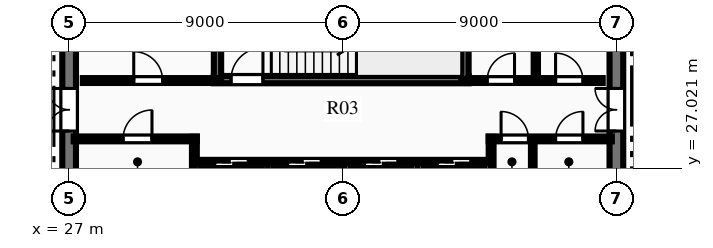
"""IFC4 building model, lengths in metres.
Left out: names, types, materials, properties, quantities, classifications, styles, units other than length and angle.
Written with IfcOpenShell. Run it as: python <this file> out.ifc"""

import sys

from ifc_helpers import new_model, si_unit, direction, frame, frame_2d, origin, place, context, subcontext, project, spatial, rectangle, extrude, element, fill, save


model = new_model("IFC4")
c1 = context("Model", 3, precision=1e-05, world=origin(), true_north=direction((0.0, 1.0)))
c2 = subcontext(c1, "Body", "Model", "MODEL_VIEW")
j1 = project(units=[si_unit("LENGTHUNIT", "METRE"), si_unit("PLANEANGLEUNIT", "RADIAN")], contexts=[c1])
p1 = place(None, origin())
s1 = spatial("IfcSite", under=j1, at=p1, CompositionType="ELEMENT")
p2 = place(p1, origin())
s2 = spatial("IfcBuilding", under=s1, at=p2, CompositionType="ELEMENT")
p3 = place(p2, frame((0.0, 0.0, 336.45)))
s3 = spatial("IfcBuildingStorey", under=s2, at=p3, CompositionType="ELEMENT", Elevation=336.45)
p4 = place(p3, frame((27.0, 18.225, 0.0), z_axis=(0.0, 0.0, 1.0), x_axis=(0.0, 1.0, 0.0)))
e1 = element("IfcWall", 1, at=p4, inside=s3, PredefinedType="SHEAR", context=c2, shape_type="SweptSolid", body=[
    extrude(rectangle(XDim=15.55, YDim=0.45, at=frame_2d((7.775, 0.0))), origin(), (0.0, 0.0, 1.0), 3.75),
])
p5 = place(p4, frame((10.015, 0.0, 0.0)))
e2 = element("IfcOpeningElement", 2, at=p5, cuts=e1, PredefinedType="OPENING", context=c2, shape_type="SweptSolid", body=[
    extrude(rectangle(XDim=1.4, YDim=2.2, at=frame_2d((0.7, 1.1))), frame((0.0, 0.235, 0.0), z_axis=(0.0, -1.0, 0.0), x_axis=(1.0, 0.0, 0.0)), (0.0, 0.0, 1.0), 0.47),
])
p6 = place(p3, frame((45.0, 18.225, 0.0), z_axis=(0.0, 0.0, 1.0), x_axis=(0.0, 1.0, 0.0)))
e3 = element("IfcWall", 3, at=p6, inside=s3, PredefinedType="SHEAR", context=c2, shape_type="SweptSolid", body=[
    extrude(rectangle(XDim=15.55, YDim=0.45, at=frame_2d((7.775, 0.0))), origin(), (0.0, 0.0, 1.0), 3.75),
])
p7 = place(p6, frame((10.015, 0.0, 0.0)))
e4 = element("IfcOpeningElement", 4, at=p7, cuts=e3, PredefinedType="OPENING", context=c2, shape_type="SweptSolid", body=[
    extrude(rectangle(XDim=1.4, YDim=2.2, at=frame_2d((0.7, 1.1))), frame((0.0, 0.235, 0.0), z_axis=(0.0, -1.0, 0.0), x_axis=(1.0, 0.0, 0.0)), (0.0, 0.0, 1.0), 0.47),
])
p8 = place(p3, frame((31.76, 29.93, 0.0), z_axis=(0.0, 0.0, 1.0), x_axis=(1.0, 0.0, 0.0)))
e5 = element("IfcWall", 5, at=p8, inside=s3, PredefinedType="SHEAR", context=c2, shape_type="SweptSolid", body=[
    extrude(rectangle(XDim=8.38, YDim=0.24, at=frame_2d((4.19, 0.0))), origin(), (0.0, 0.0, 1.0), 3.75),
])
p9 = place(p8, frame((0.565, 0.0, 0.0)))
e6 = element("IfcOpeningElement", 6, at=p9, cuts=e5, PredefinedType="OPENING", context=c2, shape_type="SweptSolid", body=[
    extrude(rectangle(XDim=1.05, YDim=2.15, at=frame_2d((0.525, 1.075))), frame((0.0, 0.13, 0.0), z_axis=(0.0, -1.0, 0.0), x_axis=(1.0, 0.0, 0.0)), (0.0, 0.0, 1.0), 0.26),
])
p10 = place(p3, frame((31.88, 29.93, 0.0), z_axis=(0.0, 0.0, 1.0), x_axis=(0.0, 1.0, 0.0)))
e7 = element("IfcWall", 7, at=p10, inside=s3, PredefinedType="SHEAR", context=c2, shape_type="SweptSolid", body=[
    extrude(rectangle(XDim=3.79, YDim=0.24, at=frame_2d((1.895, 0.0))), origin(), (0.0, 0.0, 1.0), 3.75),
])
p11 = place(p3, frame((40.02, 29.93, 0.0), z_axis=(0.0, 0.0, 1.0), x_axis=(0.0, 1.0, 0.0)))
e8 = element("IfcWall", 8, at=p11, inside=s3, PredefinedType="SHEAR", context=c2, shape_type="SweptSolid", body=[
    extrude(rectangle(XDim=3.85, YDim=0.24, at=frame_2d((1.925, 0.0))), origin(), (0.0, 0.0, 1.0), 3.75),
])
p12 = place(p3, frame((27.15, 27.98, 0.0), z_axis=(0.0, 0.0, 1.0), x_axis=(1.0, 0.0, 0.0)))
e9 = element("IfcWall", 9, at=p12, inside=s3, PredefinedType="PARTITIONING", context=c2, shape_type="SweptSolid", body=[
    extrude(rectangle(XDim=4.05, YDim=0.16, at=frame_2d((2.025, 0.0))), origin(), (0.0, 0.0, 1.0), 3.49),
])
p13 = place(p12, frame((1.625, 0.0, 0.0)))
e10 = element("IfcOpeningElement", 10, at=p13, cuts=e9, PredefinedType="OPENING", context=c2, shape_type="SweptSolid", body=[
    extrude(rectangle(XDim=0.95, YDim=2.15, at=frame_2d((0.475, 1.075))), frame((0.0, 0.09, 0.0), z_axis=(0.0, -1.0, 0.0), x_axis=(1.0, 0.0, 0.0)), (0.0, 0.0, 1.0), 0.18),
])
p14 = place(p3, frame((31.12, 26.54, 0.0), z_axis=(0.0, 0.0, 1.0), x_axis=(0.0, 1.0, 0.0)))
e11 = element("IfcWall", 11, at=p14, inside=s3, PredefinedType="PARTITIONING", context=c2, shape_type="SweptSolid", body=[
    extrude(rectangle(XDim=1.51, YDim=0.16, at=frame_2d((0.755, 0.0))), origin(), (0.0, 0.0, 1.0), 3.49),
])
p15 = place(p3, frame((40.8, 27.98, 0.0), z_axis=(0.0, 0.0, 1.0), x_axis=(1.0, 0.0, 0.0)))
e12 = element("IfcWall", 12, at=p15, inside=s3, PredefinedType="PARTITIONING", context=c2, shape_type="SweptSolid", body=[
    extrude(rectangle(XDim=4.05, YDim=0.16, at=frame_2d((2.025, 0.0))), origin(), (0.0, 0.0, 1.0), 3.49),
])
p16 = place(p15, frame((0.407, 0.0, 0.0)))
e13 = element("IfcOpeningElement", 13, at=p16, cuts=e12, PredefinedType="OPENING", context=c2, shape_type="SweptSolid", body=[
    extrude(rectangle(XDim=0.9, YDim=2.15, at=frame_2d((0.45, 1.075))), frame((0.0, 0.09, 0.0), z_axis=(0.0, -1.0, 0.0), x_axis=(1.0, 0.0, 0.0)), (0.0, 0.0, 1.0), 0.18),
])
p17 = place(p15, frame((2.2, 0.0, 0.0)))
e14 = element("IfcOpeningElement", 14, at=p17, cuts=e12, PredefinedType="OPENING", context=c2, shape_type="SweptSolid", body=[
    extrude(rectangle(XDim=0.9, YDim=2.15, at=frame_2d((0.45, 1.075))), frame((0.0, 0.09, 0.0), z_axis=(0.0, -1.0, 0.0), x_axis=(1.0, 0.0, 0.0)), (0.0, 0.0, 1.0), 0.18),
])
p18 = place(p3, frame((40.88, 26.54, 0.0), z_axis=(0.0, 0.0, 1.0), x_axis=(0.0, 1.0, 0.0)))
e15 = element("IfcWall", 15, at=p18, inside=s3, PredefinedType="PARTITIONING", context=c2, shape_type="SweptSolid", body=[
    extrude(rectangle(XDim=1.51, YDim=0.16, at=frame_2d((0.755, 0.0))), origin(), (0.0, 0.0, 1.0), 3.49),
])
p19 = place(p3, frame((42.25, 26.54, 0.0), z_axis=(0.0, 0.0, 1.0), x_axis=(0.0, 1.0, 0.0)))
e16 = element("IfcWall", 16, at=p19, inside=s3, PredefinedType="PARTITIONING", context=c2, shape_type="SweptSolid", body=[
    extrude(rectangle(XDim=1.44, YDim=0.12, at=frame_2d((0.72, 0.0))), origin(), (0.0, 0.0, 1.0), 3.49),
])
p20 = place(p3, frame((27.45, 29.9, 0.0), z_axis=(0.0, 0.0, 1.0), x_axis=(1.0, 0.0, 0.0)))
e17 = element("IfcWall", 17, at=p20, inside=s3, PredefinedType="PARTITIONING", context=c2, shape_type="SweptSolid", body=[
    extrude(rectangle(XDim=4.43, YDim=0.16, at=frame_2d((2.215, 0.0))), origin(), (0.0, 0.0, 1.0), 3.49),
])
p21 = place(p20, frame((1.675, 0.0, 0.0)))
e18 = element("IfcOpeningElement", 18, at=p21, cuts=e17, PredefinedType="OPENING", context=c2, shape_type="SweptSolid", body=[
    extrude(rectangle(XDim=0.95, YDim=2.15, at=frame_2d((0.475, 1.075))), frame((0.0, 0.09, 0.0), z_axis=(0.0, -1.0, 0.0), x_axis=(1.0, 0.0, 0.0)), (0.0, 0.0, 1.0), 0.18),
])
p22 = place(p3, frame((40.12, 29.9, 0.0), z_axis=(0.0, 0.0, 1.0), x_axis=(1.0, 0.0, 0.0)))
e19 = element("IfcWall", 19, at=p22, inside=s3, PredefinedType="PARTITIONING", context=c2, shape_type="SweptSolid", body=[
    extrude(rectangle(XDim=4.43, YDim=0.16, at=frame_2d((2.215, 0.0))), origin(), (0.0, 0.0, 1.0), 3.49),
])
p23 = place(p22, frame((0.63, 0.0, 0.0)))
e20 = element("IfcOpeningElement", 20, at=p23, cuts=e19, PredefinedType="OPENING", context=c2, shape_type="SweptSolid", body=[
    extrude(rectangle(XDim=0.9, YDim=2.15, at=frame_2d((0.45, 1.075))), frame((0.0, 0.09, 0.0), z_axis=(0.0, -1.0, 0.0), x_axis=(1.0, 0.0, 0.0)), (0.0, 0.0, 1.0), 0.18),
])
p24 = place(p22, frame((2.88, 0.0, 0.0)))
e21 = element("IfcOpeningElement", 21, at=p24, cuts=e19, PredefinedType="OPENING", context=c2, shape_type="SweptSolid", body=[
    extrude(rectangle(XDim=0.9, YDim=2.15, at=frame_2d((0.45, 1.075))), frame((0.0, 0.09, 0.0), z_axis=(0.0, -1.0, 0.0), x_axis=(1.0, 0.0, 0.0)), (0.0, 0.0, 1.0), 0.18),
])
p25 = place(p3, frame((42.35, 29.95, 0.0), z_axis=(0.0, 0.0, 1.0), x_axis=(0.0, 1.0, 0.0)))
e22 = element("IfcWall", 22, at=p25, inside=s3, PredefinedType="PARTITIONING", context=c2, shape_type="SweptSolid", body=[
    extrude(rectangle(XDim=3.6, YDim=0.14, at=frame_2d((1.8, 0.0))), origin(), (0.0, 0.0, 1.0), 3.49),
])
p26 = place(p3, frame((31.2, 27.2, 0.0), z_axis=(0.0, 0.0, 1.0), x_axis=(1.0, 0.0, 0.0)))
e23 = element("IfcWall", 23, at=p26, inside=s3, PredefinedType="PARTITIONING", context=c2, shape_type="SweptSolid", body=[
    extrude(rectangle(XDim=9.6, YDim=0.18, at=frame_2d((4.8, 0.0))), origin(), (0.0, 0.0, 1.0), 3.49),
])
p27 = place(p26, frame((0.59, 0.0, 0.0)))
e24 = element("IfcOpeningElement", 24, at=p27, cuts=e23, PredefinedType="OPENING", context=c2, shape_type="SweptSolid", body=[
    extrude(rectangle(XDim=1.1, YDim=2.15, at=frame_2d((0.55, 1.075))), frame((0.0, 0.1, 0.0), z_axis=(0.0, -1.0, 0.0), x_axis=(1.0, 0.0, 0.0)), (0.0, 0.0, 1.0), 0.2),
])
p28 = place(p26, frame((2.99, 0.0, 0.0)))
e25 = element("IfcOpeningElement", 25, at=p28, cuts=e23, PredefinedType="OPENING", context=c2, shape_type="SweptSolid", body=[
    extrude(rectangle(XDim=1.1, YDim=2.15, at=frame_2d((0.55, 1.075))), frame((0.0, 0.1, 0.0), z_axis=(0.0, -1.0, 0.0), x_axis=(1.0, 0.0, 0.0)), (0.0, 0.0, 1.0), 0.2),
])
p29 = place(p26, frame((5.51, 0.0, 0.0)))
e26 = element("IfcOpeningElement", 26, at=p29, cuts=e23, PredefinedType="OPENING", context=c2, shape_type="SweptSolid", body=[
    extrude(rectangle(XDim=1.1, YDim=2.15, at=frame_2d((0.55, 1.075))), frame((0.0, 0.1, 0.0), z_axis=(0.0, -1.0, 0.0), x_axis=(1.0, 0.0, 0.0)), (0.0, 0.0, 1.0), 0.2),
])
p30 = place(p26, frame((7.91, 0.0, 0.0)))
e27 = element("IfcOpeningElement", 27, at=p30, cuts=e23, PredefinedType="OPENING", context=c2, shape_type="SweptSolid", body=[
    extrude(rectangle(XDim=1.1, YDim=2.15, at=frame_2d((0.55, 1.075))), frame((0.0, 0.1, 0.0), z_axis=(0.0, -1.0, 0.0), x_axis=(1.0, 0.0, 0.0)), (0.0, 0.0, 1.0), 0.2),
])
for number, where, z_axis, x_axis in (
    (28, (33.54, 25.3, 0.0), (0.0, 0.0, 1.0), (0.0, 1.0, 0.0)),
    (29, (36.0, 25.3, 0.0), (0.0, 0.0, 1.0), (0.0, 1.0, 0.0)),
    (30, (38.46, 25.3, 0.0), (0.0, 0.0, 1.0), (0.0, 1.0, 0.0)),
):
    element("IfcWall", number, at=place(p3, frame(where, z_axis=z_axis, x_axis=x_axis)), inside=s3, PredefinedType="PARTITIONING", context=c2, shape_type="SweptSolid", body=[
        extrude(rectangle(XDim=1.9, YDim=0.18, at=frame_2d((0.95, 0.0))), origin(), (0.0, 0.0, 1.0), 3.49),
    ])
p31 = place(p13, origin())
e31 = element("IfcDoor", 31, at=p31, inside=s3, OperationType="SINGLE_SWING_RIGHT", PredefinedType="DOOR", context=c2, shape_type="SweptSolid", body=[
    extrude(rectangle(XDim=0.95, YDim=2.15, at=frame_2d((0.475, 1.075))), frame((0.0, 0.025, 0.0), z_axis=(0.0, -1.0, 0.0), x_axis=(1.0, 0.0, 0.0)), (0.0, 0.0, 1.0), 0.05),
])
fill(e10, e31)
p32 = place(p16, origin())
e32 = element("IfcDoor", 32, at=p32, inside=s3, OperationType="SINGLE_SWING_LEFT", PredefinedType="DOOR", context=c2, shape_type="SweptSolid", body=[
    extrude(rectangle(XDim=0.9, YDim=2.15, at=frame_2d((0.45, 1.075))), frame((0.0, 0.025, 0.0), z_axis=(0.0, -1.0, 0.0), x_axis=(1.0, 0.0, 0.0)), (0.0, 0.0, 1.0), 0.05),
])
fill(e13, e32)
p33 = place(p17, origin())
e33 = element("IfcDoor", 33, at=p33, inside=s3, OperationType="SINGLE_SWING_RIGHT", PredefinedType="DOOR", context=c2, shape_type="SweptSolid", body=[
    extrude(rectangle(XDim=0.9, YDim=2.15, at=frame_2d((0.45, 1.075))), frame((0.0, 0.025, 0.0), z_axis=(0.0, -1.0, 0.0), x_axis=(1.0, 0.0, 0.0)), (0.0, 0.0, 1.0), 0.05),
])
fill(e14, e33)
p34 = place(p21, origin())
e34 = element("IfcDoor", 34, at=p34, inside=s3, OperationType="SINGLE_SWING_LEFT", PredefinedType="DOOR", context=c2, shape_type="SweptSolid", body=[
    extrude(rectangle(XDim=0.95, YDim=2.15, at=frame_2d((0.475, 1.075))), frame((0.0, 0.025, 0.0), z_axis=(0.0, -1.0, 0.0), x_axis=(1.0, 0.0, 0.0)), (0.0, 0.0, 1.0), 0.05),
])
fill(e18, e34)
p35 = place(p23, origin())
e35 = element("IfcDoor", 35, at=p35, inside=s3, OperationType="SINGLE_SWING_RIGHT", PredefinedType="DOOR", context=c2, shape_type="SweptSolid", body=[
    extrude(rectangle(XDim=0.9, YDim=2.15, at=frame_2d((0.45, 1.075))), frame((0.0, 0.025, 0.0), z_axis=(0.0, -1.0, 0.0), x_axis=(1.0, 0.0, 0.0)), (0.0, 0.0, 1.0), 0.05),
])
fill(e20, e35)
p36 = place(p24, origin())
e36 = element("IfcDoor", 36, at=p36, inside=s3, OperationType="SINGLE_SWING_LEFT", PredefinedType="DOOR", context=c2, shape_type="SweptSolid", body=[
    extrude(rectangle(XDim=0.9, YDim=2.15, at=frame_2d((0.45, 1.075))), frame((0.0, 0.025, 0.0), z_axis=(0.0, -1.0, 0.0), x_axis=(1.0, 0.0, 0.0)), (0.0, 0.0, 1.0), 0.05),
])
fill(e21, e36)
p37 = place(p9, origin())
e37 = element("IfcDoor", 37, at=p37, inside=s3, OperationType="SINGLE_SWING_RIGHT", PredefinedType="DOOR", context=c2, shape_type="SweptSolid", body=[
    extrude(rectangle(XDim=1.05, YDim=2.15, at=frame_2d((0.525, 1.075))), frame((0.0, 0.025, 0.0), z_axis=(0.0, -1.0, 0.0), x_axis=(1.0, 0.0, 0.0)), (0.0, 0.0, 1.0), 0.05),
])
fill(e6, e37)
p38 = place(p5, origin())
e38 = element("IfcDoor", 38, at=p38, inside=s3, OperationType="DOUBLE_DOOR_SINGLE_SWING", PredefinedType="DOOR", context=c2, shape_type="SweptSolid", body=[
    extrude(rectangle(XDim=1.4, YDim=2.2, at=frame_2d((0.7, 1.1))), frame((0.0, 0.025, 0.0), z_axis=(0.0, -1.0, 0.0), x_axis=(1.0, 0.0, 0.0)), (0.0, 0.0, 1.0), 0.05),
])
fill(e2, e38)
p39 = place(p7, origin())
e39 = element("IfcDoor", 39, at=p39, inside=s3, OperationType="DOUBLE_DOOR_SINGLE_SWING", PredefinedType="DOOR", context=c2, shape_type="SweptSolid", body=[
    extrude(rectangle(XDim=1.4, YDim=2.2, at=frame_2d((0.7, 1.1))), frame((0.0, 0.025, 0.0), z_axis=(0.0, -1.0, 0.0), x_axis=(1.0, 0.0, 0.0)), (0.0, 0.0, 1.0), 0.05),
])
fill(e4, e39)
p40 = place(p27, origin())
e40 = element("IfcDoor", 40, at=p40, inside=s3, OperationType="SLIDING_TO_LEFT", PredefinedType="DOOR", context=c2, shape_type="SweptSolid", body=[
    extrude(rectangle(XDim=1.1, YDim=2.15, at=frame_2d((0.55, 1.075))), frame((0.0, 0.025, 0.0), z_axis=(0.0, -1.0, 0.0), x_axis=(1.0, 0.0, 0.0)), (0.0, 0.0, 1.0), 0.05),
])
fill(e24, e40)
p41 = place(p28, origin())
e41 = element("IfcDoor", 41, at=p41, inside=s3, OperationType="SLIDING_TO_LEFT", PredefinedType="DOOR", context=c2, shape_type="SweptSolid", body=[
    extrude(rectangle(XDim=1.1, YDim=2.15, at=frame_2d((0.55, 1.075))), frame((0.0, 0.025, 0.0), z_axis=(0.0, -1.0, 0.0), x_axis=(1.0, 0.0, 0.0)), (0.0, 0.0, 1.0), 0.05),
])
fill(e25, e41)
p42 = place(p29, origin())
e42 = element("IfcDoor", 42, at=p42, inside=s3, OperationType="SLIDING_TO_LEFT", PredefinedType="DOOR", context=c2, shape_type="SweptSolid", body=[
    extrude(rectangle(XDim=1.1, YDim=2.15, at=frame_2d((0.55, 1.075))), frame((0.0, 0.025, 0.0), z_axis=(0.0, -1.0, 0.0), x_axis=(1.0, 0.0, 0.0)), (0.0, 0.0, 1.0), 0.05),
])
fill(e26, e42)
p43 = place(p30, origin())
e43 = element("IfcDoor", 43, at=p43, inside=s3, OperationType="SLIDING_TO_LEFT", PredefinedType="DOOR", context=c2, shape_type="SweptSolid", body=[
    extrude(rectangle(XDim=1.1, YDim=2.15, at=frame_2d((0.55, 1.075))), frame((0.0, 0.025, 0.0), z_axis=(0.0, -1.0, 0.0), x_axis=(1.0, 0.0, 0.0)), (0.0, 0.0, 1.0), 0.05),
])
fill(e27, e43)
save(model, sys.argv[1])
